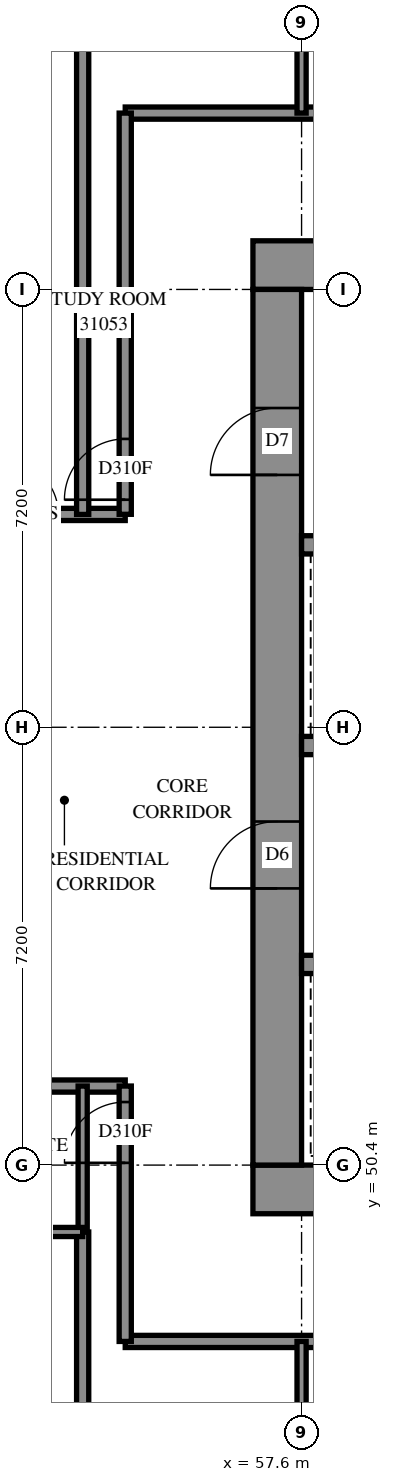
"""IFC4 building model, lengths in metres.
Left out: names, types, materials, properties, quantities, classifications, styles, units other than length and angle.
Written with IfcOpenShell. Run it as: python <this file> out.ifc"""

import sys

from ifc_helpers import new_model, si_unit, direction, frame, frame_2d, origin, place, context, subcontext, project, spatial, rectangle, extrude, element, fill, save


model = new_model("IFC4")
c1 = context("Model", 3, precision=1e-05, world=origin(), true_north=direction((0.0, 1.0)))
c2 = subcontext(c1, "Body", "Model", "MODEL_VIEW")
j1 = project(units=[si_unit("LENGTHUNIT", "METRE"), si_unit("PLANEANGLEUNIT", "RADIAN")], contexts=[c1])
p1 = place(None, origin())
s1 = spatial("IfcSite", under=j1, at=p1, CompositionType="ELEMENT")
p2 = place(p1, origin())
s2 = spatial("IfcBuilding", under=s1, at=p2, CompositionType="ELEMENT")
p3 = place(p2, frame((0.0, 0.0, 115.2)))
s3 = spatial("IfcBuildingStorey", under=s2, at=p3, CompositionType="ELEMENT", Elevation=115.2)
p4 = place(p3, frame((56.8, 50.0, -0.3), z_axis=(0.0, 0.0, 1.0), x_axis=(1.0, 0.0, 0.0)))
e1 = element("IfcWall", 1, at=p4, inside=s3, PredefinedType="SHEAR", context=c2, shape_type="SweptSolid", body=[
    extrude(rectangle(XDim=16.0, YDim=0.8, at=frame_2d((8.0, 0.0))), origin(), (0.0, 0.0, 1.0), 2.7),
])
p5 = place(p3, frame((56.8, 65.2, -0.3), z_axis=(0.0, 0.0, 1.0), x_axis=(1.0, 0.0, 0.0)))
e2 = element("IfcWall", 2, at=p5, inside=s3, PredefinedType="SHEAR", context=c2, shape_type="SweptSolid", body=[
    extrude(rectangle(XDim=16.0, YDim=0.8, at=frame_2d((8.0, 0.0))), origin(), (0.0, 0.0, 1.0), 2.7),
])
p6 = place(p5, frame((10.8, 0.0, 0.3)))
e3 = element("IfcOpeningElement", 3, at=p6, cuts=e2, PredefinedType="OPENING", context=c2, shape_type="SweptSolid", body=[
    extrude(rectangle(XDim=0.8, YDim=2.1, at=frame_2d((0.4, 1.05))), frame((0.0, 0.41, 0.0), z_axis=(0.0, -1.0, 0.0), x_axis=(1.0, 0.0, 0.0)), (0.0, 0.0, 1.0), 0.82),
])
p7 = place(p3, frame((57.2, 50.4, -0.3), z_axis=(0.0, 0.0, 1.0), x_axis=(0.0, 1.0, 0.0)))
e4 = element("IfcWall", 4, at=p7, inside=s3, PredefinedType="SHEAR", context=c2, shape_type="SweptSolid", body=[
    extrude(rectangle(XDim=14.4, YDim=0.8, at=frame_2d((7.2, 0.0))), origin(), (0.0, 0.0, 1.0), 2.7),
])
p8 = place(p7, frame((4.55, 0.0, 0.3)))
e5 = element("IfcOpeningElement", 5, at=p8, cuts=e4, PredefinedType="OPENING", context=c2, shape_type="SweptSolid", body=[
    extrude(rectangle(XDim=1.1, YDim=2.1, at=frame_2d((0.55, 1.05))), frame((0.0, 0.41, 0.0), z_axis=(0.0, -1.0, 0.0), x_axis=(1.0, 0.0, 0.0)), (0.0, 0.0, 1.0), 0.82),
])
p9 = place(p7, frame((11.35, 0.0, 0.3)))
e6 = element("IfcOpeningElement", 6, at=p9, cuts=e4, PredefinedType="OPENING", context=c2, shape_type="SweptSolid", body=[
    extrude(rectangle(XDim=1.1, YDim=2.1, at=frame_2d((0.55, 1.05))), frame((0.0, 0.41, 0.0), z_axis=(0.0, -1.0, 0.0), x_axis=(1.0, 0.0, 0.0)), (0.0, 0.0, 1.0), 0.82),
])
p10 = place(p3, frame((57.6, 53.7, 0.0), z_axis=(0.0, 0.0, 1.0), x_axis=(1.0, 0.0, 0.0)))
e7 = element("IfcWall", 7, at=p10, inside=s3, PredefinedType="SOLIDWALL", context=c2, shape_type="SweptSolid", body=[
    extrude(rectangle(XDim=14.4, YDim=0.3, at=frame_2d((7.2, 0.0))), origin(), (0.0, 0.0, 1.0), 3.1),
])
p11 = place(p10, frame((1.25, 0.0, 0.0)))
e8 = element("IfcOpeningElement", 8, at=p11, cuts=e7, PredefinedType="OPENING", context=c2, shape_type="SweptSolid", body=[
    extrude(rectangle(XDim=1.1, YDim=2.1, at=frame_2d((0.55, 1.05))), frame((0.0, 0.16, 0.0), z_axis=(0.0, -1.0, 0.0), x_axis=(1.0, 0.0, 0.0)), (0.0, 0.0, 1.0), 0.32),
])
p12 = place(p10, frame((4.85, 0.0, 0.0)))
e9 = element("IfcOpeningElement", 9, at=p12, cuts=e7, PredefinedType="OPENING", context=c2, shape_type="SweptSolid", body=[
    extrude(rectangle(XDim=1.1, YDim=2.1, at=frame_2d((0.55, 1.05))), frame((0.0, 0.16, 0.0), z_axis=(0.0, -1.0, 0.0), x_axis=(1.0, 0.0, 0.0)), (0.0, 0.0, 1.0), 0.32),
])
p13 = place(p10, frame((8.45, 0.0, 0.0)))
e10 = element("IfcOpeningElement", 10, at=p13, cuts=e7, PredefinedType="OPENING", context=c2, shape_type="SweptSolid", body=[
    extrude(rectangle(XDim=1.1, YDim=2.1, at=frame_2d((0.55, 1.05))), frame((0.0, 0.16, 0.0), z_axis=(0.0, -1.0, 0.0), x_axis=(1.0, 0.0, 0.0)), (0.0, 0.0, 1.0), 0.32),
])
p14 = place(p10, frame((12.05, 0.0, 0.0)))
e11 = element("IfcOpeningElement", 11, at=p14, cuts=e7, PredefinedType="OPENING", context=c2, shape_type="SweptSolid", body=[
    extrude(rectangle(XDim=1.1, YDim=2.1, at=frame_2d((0.55, 1.05))), frame((0.0, 0.16, 0.0), z_axis=(0.0, -1.0, 0.0), x_axis=(1.0, 0.0, 0.0)), (0.0, 0.0, 1.0), 0.32),
])
p15 = place(p3, frame((57.6, 57.3, 0.0), z_axis=(0.0, 0.0, 1.0), x_axis=(1.0, 0.0, 0.0)))
e12 = element("IfcWall", 12, at=p15, inside=s3, PredefinedType="SOLIDWALL", context=c2, shape_type="SweptSolid", body=[
    extrude(rectangle(XDim=14.4, YDim=0.3, at=frame_2d((7.2, 0.0))), origin(), (0.0, 0.0, 1.0), 3.1),
])
p16 = place(p15, frame((12.05, 0.0, 0.0)))
e13 = element("IfcOpeningElement", 13, at=p16, cuts=e12, PredefinedType="OPENING", context=c2, shape_type="SweptSolid", body=[
    extrude(rectangle(XDim=1.1, YDim=2.1, at=frame_2d((0.55, 1.05))), frame((0.0, 0.16, 0.0), z_axis=(0.0, -1.0, 0.0), x_axis=(1.0, 0.0, 0.0)), (0.0, 0.0, 1.0), 0.32),
])
p17 = place(p3, frame((57.6, 60.6, 0.0), z_axis=(0.0, 0.0, 1.0), x_axis=(1.0, 0.0, 0.0)))
e14 = element("IfcWall", 14, at=p17, inside=s3, PredefinedType="SOLIDWALL", context=c2, shape_type="SweptSolid", body=[
    extrude(rectangle(XDim=7.2, YDim=0.3, at=frame_2d((3.6, 0.0))), origin(), (0.0, 0.0, 1.0), 3.1),
])
p18 = place(p3, frame((33.502, 61.1, 0.0), z_axis=(0.0, 0.0, 1.0), x_axis=(1.0, 0.0, 0.0)))
e15 = element("IfcWall", 15, at=p18, inside=s3, PredefinedType="PARTITIONING", context=c2, shape_type="SweptSolid", body=[
    extrude(rectangle(XDim=21.198, YDim=0.2, at=frame_2d((10.599, 0.0))), origin(), (0.0, 0.0, 1.0), 3.1),
])
p19 = place(p18, frame((4.798, 0.0, 0.0)))
e16 = element("IfcOpeningElement", 16, at=p19, cuts=e15, PredefinedType="OPENING", context=c2, shape_type="SweptSolid", body=[
    extrude(rectangle(XDim=0.9, YDim=2.1, at=frame_2d((0.45, 1.05))), frame((0.0, 0.11, 0.0), z_axis=(0.0, -1.0, 0.0), x_axis=(1.0, 0.0, 0.0)), (0.0, 0.0, 1.0), 0.22),
])
p20 = place(p18, frame((6.498, 0.0, 0.0)))
e17 = element("IfcOpeningElement", 17, at=p20, cuts=e15, PredefinedType="OPENING", context=c2, shape_type="SweptSolid", body=[
    extrude(rectangle(XDim=0.9, YDim=2.1, at=frame_2d((0.45, 1.05))), frame((0.0, 0.11, 0.0), z_axis=(0.0, -1.0, 0.0), x_axis=(1.0, 0.0, 0.0)), (0.0, 0.0, 1.0), 0.22),
])
p21 = place(p18, frame((11.998, 0.0, 0.0)))
e18 = element("IfcOpeningElement", 18, at=p21, cuts=e15, PredefinedType="OPENING", context=c2, shape_type="SweptSolid", body=[
    extrude(rectangle(XDim=0.9, YDim=2.1, at=frame_2d((0.45, 1.05))), frame((0.0, 0.11, 0.0), z_axis=(0.0, -1.0, 0.0), x_axis=(1.0, 0.0, 0.0)), (0.0, 0.0, 1.0), 0.22),
])
p22 = place(p18, frame((13.698, 0.0, 0.0)))
e19 = element("IfcOpeningElement", 19, at=p22, cuts=e15, PredefinedType="OPENING", context=c2, shape_type="SweptSolid", body=[
    extrude(rectangle(XDim=0.9, YDim=2.1, at=frame_2d((0.45, 1.05))), frame((0.0, 0.11, 0.0), z_axis=(0.0, -1.0, 0.0), x_axis=(1.0, 0.0, 0.0)), (0.0, 0.0, 1.0), 0.22),
])
p23 = place(p18, frame((19.198, 0.0, 0.0)))
e20 = element("IfcOpeningElement", 20, at=p23, cuts=e15, PredefinedType="OPENING", context=c2, shape_type="SweptSolid", body=[
    extrude(rectangle(XDim=0.9, YDim=2.1, at=frame_2d((0.45, 1.05))), frame((0.0, 0.11, 0.0), z_axis=(0.0, -1.0, 0.0), x_axis=(1.0, 0.0, 0.0)), (0.0, 0.0, 1.0), 0.22),
])
p24 = place(p3, frame((54.7, 67.7, 0.0), z_axis=(0.0, 0.0, 1.0), x_axis=(1.0, 0.0, 0.0)))
e21 = element("IfcWall", 21, at=p24, inside=s3, PredefinedType="PARTITIONING", context=c2, shape_type="SweptSolid", body=[
    extrude(rectangle(XDim=20.2, YDim=0.2, at=frame_2d((10.1, 0.0))), origin(), (0.0, 0.0, 1.0), 3.1),
])
p25 = place(p24, frame((5.2, 0.0, 0.0)))
e22 = element("IfcOpeningElement", 22, at=p25, cuts=e21, PredefinedType="OPENING", context=c2, shape_type="SweptSolid", body=[
    extrude(rectangle(XDim=0.9, YDim=2.1, at=frame_2d((0.45, 1.05))), frame((0.0, 0.11, 0.0), z_axis=(0.0, -1.0, 0.0), x_axis=(1.0, 0.0, 0.0)), (0.0, 0.0, 1.0), 0.22),
])
p26 = place(p24, frame((8.838, 0.0, 0.0)))
e23 = element("IfcOpeningElement", 23, at=p26, cuts=e21, PredefinedType="OPENING", context=c2, shape_type="SweptSolid", body=[
    extrude(rectangle(XDim=1.0, YDim=2.1, at=frame_2d((0.5, 1.05))), frame((0.0, 0.11, 0.0), z_axis=(0.0, -1.0, 0.0), x_axis=(1.0, 0.0, 0.0)), (0.0, 0.0, 1.0), 0.22),
])
p27 = place(p24, frame((14.1, 0.0, 0.0)))
e24 = element("IfcOpeningElement", 24, at=p27, cuts=e21, PredefinedType="OPENING", context=c2, shape_type="SweptSolid", body=[
    extrude(rectangle(XDim=0.9, YDim=2.1, at=frame_2d((0.45, 1.05))), frame((0.0, 0.11, 0.0), z_axis=(0.0, -1.0, 0.0), x_axis=(1.0, 0.0, 0.0)), (0.0, 0.0, 1.0), 0.22),
])
p28 = place(p3, frame((54.7, 47.5, 0.0), z_axis=(0.0, 0.0, 1.0), x_axis=(1.0, 0.0, 0.0)))
e25 = element("IfcWall", 25, at=p28, inside=s3, PredefinedType="PARTITIONING", context=c2, shape_type="SweptSolid", body=[
    extrude(rectangle(XDim=19.442, YDim=0.2, at=frame_2d((9.721, 0.0))), origin(), (0.0, 0.0, 1.0), 3.1),
])
p29 = place(p28, frame((5.2, 0.0, 0.0)))
e26 = element("IfcOpeningElement", 26, at=p29, cuts=e25, PredefinedType="OPENING", context=c2, shape_type="SweptSolid", body=[
    extrude(rectangle(XDim=0.9, YDim=2.1, at=frame_2d((0.45, 1.05))), frame((0.0, 0.11, 0.0), z_axis=(0.0, -1.0, 0.0), x_axis=(1.0, 0.0, 0.0)), (0.0, 0.0, 1.0), 0.22),
])
p30 = place(p28, frame((8.757, 0.0, 0.0)))
e27 = element("IfcOpeningElement", 27, at=p30, cuts=e25, PredefinedType="OPENING", context=c2, shape_type="SweptSolid", body=[
    extrude(rectangle(XDim=0.9, YDim=2.1, at=frame_2d((0.45, 1.05))), frame((0.0, 0.11, 0.0), z_axis=(0.0, -1.0, 0.0), x_axis=(1.0, 0.0, 0.0)), (0.0, 0.0, 1.0), 0.22),
])
p31 = place(p28, frame((14.05, 0.0, 0.0)))
e28 = element("IfcOpeningElement", 28, at=p31, cuts=e25, PredefinedType="OPENING", context=c2, shape_type="SweptSolid", body=[
    extrude(rectangle(XDim=0.9, YDim=2.1, at=frame_2d((0.45, 1.05))), frame((0.0, 0.11, 0.0), z_axis=(0.0, -1.0, 0.0), x_axis=(1.0, 0.0, 0.0)), (0.0, 0.0, 1.0), 0.22),
])
p32 = place(p3, frame((54.0, 61.1, 0.0), z_axis=(0.0, 0.0, 1.0), x_axis=(0.0, 1.0, 0.0)))
e29 = element("IfcWall", 29, at=p32, inside=s3, PredefinedType="PARTITIONING", context=c2, shape_type="SweptSolid", body=[
    extrude(rectangle(XDim=11.621, YDim=0.2, at=frame_2d((5.811, 0.0))), origin(), (0.0, 0.0, 1.0), 3.1),
])
p33 = place(p3, frame((54.0, 42.312, 0.0), z_axis=(0.0, 0.0, 1.0), x_axis=(0.0, 1.0, 0.0)))
e30 = element("IfcWall", 30, at=p33, inside=s3, PredefinedType="PARTITIONING", context=c2, shape_type="SweptSolid", body=[
    extrude(rectangle(XDim=6.988, YDim=0.2, at=frame_2d((3.494, 0.0))), origin(), (0.0, 0.0, 1.0), 3.1),
])
p34 = place(p3, frame((54.7, 61.102, 0.0), z_axis=(0.0, 0.0, 1.0), x_axis=(0.0, 1.0, 0.0)))
e31 = element("IfcWall", 31, at=p34, inside=s3, PredefinedType="PARTITIONING", context=c2, shape_type="SweptSolid", body=[
    extrude(rectangle(XDim=6.598, YDim=0.2, at=frame_2d((3.299, 0.0))), origin(), (0.0, 0.0, 1.0), 3.1),
])
p35 = place(p34, frame((0.24, 0.0, 0.0)))
e32 = element("IfcOpeningElement", 32, at=p35, cuts=e31, PredefinedType="OPENING", context=c2, shape_type="SweptSolid", body=[
    extrude(rectangle(XDim=1.0, YDim=2.1, at=frame_2d((0.5, 1.05))), frame((0.0, 0.11, 0.0), z_axis=(0.0, -1.0, 0.0), x_axis=(1.0, 0.0, 0.0)), (0.0, 0.0, 1.0), 0.22),
])
p36 = place(p3, frame((50.4, 51.7, 0.0), z_axis=(0.0, 0.0, 1.0), x_axis=(1.0, 0.0, 0.0)))
e33 = element("IfcWall", 33, at=p36, inside=s3, PredefinedType="PARTITIONING", context=c2, shape_type="SweptSolid", body=[
    extrude(rectangle(XDim=4.3, YDim=0.2, at=frame_2d((2.15, 0.0))), origin(), (0.0, 0.0, 1.0), 3.1),
])
p37 = place(p36, frame((0.552, 0.0, 0.0)))
e34 = element("IfcOpeningElement", 34, at=p37, cuts=e33, PredefinedType="OPENING", context=c2, shape_type="SweptSolid", body=[
    extrude(rectangle(XDim=0.9, YDim=2.1, at=frame_2d((0.45, 1.05))), frame((0.0, 0.11, 0.0), z_axis=(0.0, -1.0, 0.0), x_axis=(1.0, 0.0, 0.0)), (0.0, 0.0, 1.0), 0.22),
])
p38 = place(p3, frame((54.7, 47.5, 0.0), z_axis=(0.0, 0.0, 1.0), x_axis=(0.0, 1.0, 0.0)))
e35 = element("IfcWall", 35, at=p38, inside=s3, PredefinedType="PARTITIONING", context=c2, shape_type="SweptSolid", body=[
    extrude(rectangle(XDim=4.2, YDim=0.2, at=frame_2d((2.1, 0.0))), origin(), (0.0, 0.0, 1.0), 3.1),
])
p39 = place(p38, frame((2.937, 0.0, 0.0)))
e36 = element("IfcOpeningElement", 36, at=p39, cuts=e35, PredefinedType="OPENING", context=c2, shape_type="SweptSolid", body=[
    extrude(rectangle(XDim=1.0, YDim=2.1, at=frame_2d((0.5, 1.05))), frame((0.0, 0.11, 0.0), z_axis=(0.0, -1.0, 0.0), x_axis=(1.0, 0.0, 0.0)), (0.0, 0.0, 1.0), 0.22),
])
for number, where, z_axis, x_axis in (
    (37, (54.0, 49.3, 0.0), (0.0, 0.0, 1.0), (0.0, 1.0, 0.0)),
    (38, (57.6, 45.1, 0.0), (0.0, 0.0, 1.0), (0.0, 1.0, 0.0)),
    (39, (57.6, 67.7, 0.0), (0.0, 0.0, 1.0), (0.0, 1.0, 0.0)),
):
    element("IfcWall", number, at=place(p3, frame(where, z_axis=z_axis, x_axis=x_axis)), inside=s3, PredefinedType="PARTITIONING", context=c2, shape_type="SweptSolid", body=[
        extrude(rectangle(XDim=2.4, YDim=0.15, at=frame_2d((1.2, 0.0))), origin(), (0.0, 0.0, 1.0), 3.1),
    ])
p40 = place(p3, frame((52.1, 49.3, 0.0), z_axis=(0.0, 0.0, 1.0), x_axis=(1.0, 0.0, 0.0)))
e40 = element("IfcWall", 40, at=p40, inside=s3, PredefinedType="PARTITIONING", context=c2, shape_type="SweptSolid", body=[
    extrude(rectangle(XDim=1.9, YDim=0.15, at=frame_2d((0.95, 0.0))), origin(), (0.0, 0.0, 1.0), 3.1),
])
p41 = place(p40, frame((0.493, 0.0, 0.0)))
e41 = element("IfcOpeningElement", 41, at=p41, cuts=e40, PredefinedType="OPENING", context=c2, shape_type="SweptSolid", body=[
    extrude(rectangle(XDim=0.8, YDim=2.1, at=frame_2d((0.4, 1.05))), frame((0.0, 0.085, 0.0), z_axis=(0.0, -1.0, 0.0), x_axis=(1.0, 0.0, 0.0)), (0.0, 0.0, 1.0), 0.17),
])
p42 = place(p8, origin())
e42 = element("IfcDoor", 42, at=p42, inside=s3, OperationType="DOUBLE_DOOR_SINGLE_SWING", PredefinedType="DOOR", context=c2, shape_type="SweptSolid", body=[
    extrude(rectangle(XDim=1.1, YDim=2.1, at=frame_2d((0.55, 1.05))), frame((0.0, 0.025, 0.0), z_axis=(0.0, -1.0, 0.0), x_axis=(1.0, 0.0, 0.0)), (0.0, 0.0, 1.0), 0.05),
])
fill(e5, e42)
p43 = place(p9, origin())
e43 = element("IfcDoor", 43, at=p43, inside=s3, OperationType="SINGLE_SWING_LEFT", PredefinedType="DOOR", context=c2, shape_type="SweptSolid", body=[
    extrude(rectangle(XDim=1.1, YDim=2.1, at=frame_2d((0.55, 1.05))), frame((0.0, 0.025, 0.0), z_axis=(0.0, -1.0, 0.0), x_axis=(1.0, 0.0, 0.0)), (0.0, 0.0, 1.0), 0.05),
])
fill(e6, e43)
p44 = place(p39, origin())
e44 = element("IfcDoor", 44, at=p44, inside=s3, OperationType="SINGLE_SWING_RIGHT", PredefinedType="DOOR", context=c2, shape_type="SweptSolid", body=[
    extrude(rectangle(XDim=1.0, YDim=2.1, at=frame_2d((0.5, 1.05))), frame((0.0, 0.025, 0.0), z_axis=(0.0, -1.0, 0.0), x_axis=(1.0, 0.0, 0.0)), (0.0, 0.0, 1.0), 0.05),
])
fill(e36, e44)
p45 = place(p23, origin())
e45 = element("IfcDoor", 45, at=p45, inside=s3, OperationType="SINGLE_SWING_RIGHT", PredefinedType="DOOR", context=c2, shape_type="SweptSolid", body=[
    extrude(rectangle(XDim=0.9, YDim=2.1, at=frame_2d((0.45, 1.05))), frame((0.0, 0.025, 0.0), z_axis=(0.0, -1.0, 0.0), x_axis=(1.0, 0.0, 0.0)), (0.0, 0.0, 1.0), 0.05),
])
fill(e20, e45)
p46 = place(p35, origin())
e46 = element("IfcDoor", 46, at=p46, inside=s3, OperationType="SINGLE_SWING_LEFT", PredefinedType="DOOR", context=c2, shape_type="SweptSolid", body=[
    extrude(rectangle(XDim=1.0, YDim=2.1, at=frame_2d((0.5, 1.05))), frame((0.0, 0.025, 0.0), z_axis=(0.0, -1.0, 0.0), x_axis=(1.0, 0.0, 0.0)), (0.0, 0.0, 1.0), 0.05),
])
fill(e32, e46)
save(model, sys.argv[1])
